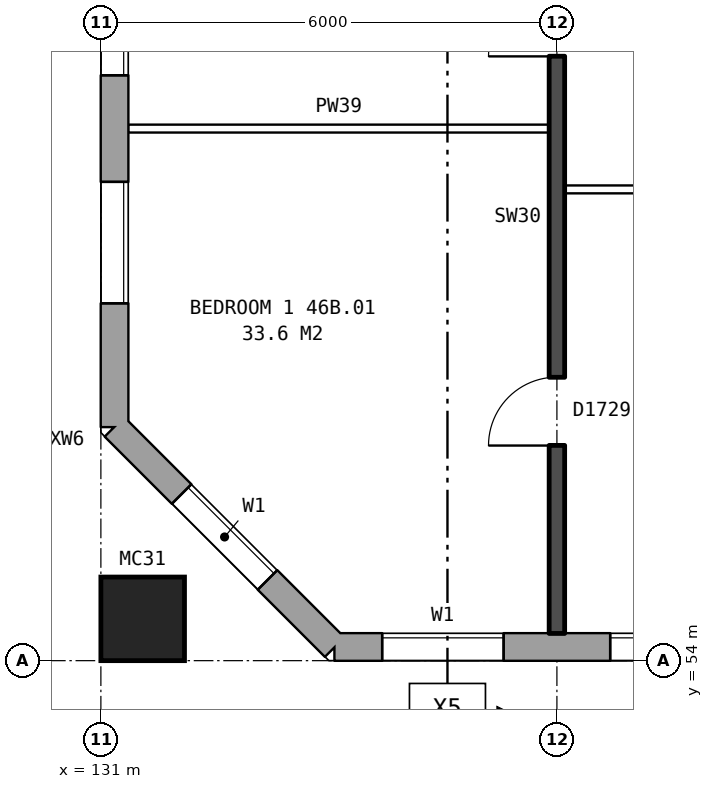
"""IFC4 building model, lengths in metres.
Left out: names, types, materials, properties, quantities, classifications, styles, units other than length and angle.
Written with IfcOpenShell. Run it as: python <this file> out.ifc"""

import sys

from ifc_helpers import new_model, si_unit, direction, frame, frame_2d, origin, origin_2d, place, context, subcontext, project, spatial, rectangle, hollow_rectangle, extrude, element, fill, save


model = new_model("IFC4")
c1 = context("Model", 3, precision=1e-05, world=origin(), true_north=direction((0.0, 1.0)))
c2 = subcontext(c1, "Body", "Model", "MODEL_VIEW")
j1 = project(units=[si_unit("LENGTHUNIT", "METRE"), si_unit("PLANEANGLEUNIT", "RADIAN")], contexts=[c1])
p1 = place(None, origin())
s1 = spatial("IfcSite", under=j1, at=p1, CompositionType="ELEMENT")
p2 = place(p1, origin())
s2 = spatial("IfcBuilding", under=s1, at=p2, CompositionType="ELEMENT")
p3 = place(p2, frame((0.0, 0.0, 164.0)))
s3 = spatial("IfcBuildingStorey", under=s2, at=p3, CompositionType="ELEMENT", Elevation=164.0)
p4 = place(p3, frame((131.55, 54.55, 0.0), z_axis=(0.0, 0.0, 1.0), x_axis=(1.0, 0.0, 0.0)))
e1 = element("IfcColumn", 1, at=p4, inside=s3, PredefinedType="COLUMN", context=c2, shape_type="SweptSolid", body=[
    extrude(hollow_rectangle(XDim=1.1, YDim=1.1, WallThickness=0.06, at=origin_2d()), origin(), (0.0, 0.0, 1.0), 3.1),
])
p5 = place(p3, frame((131.18, 57.075, 0.0), z_axis=(0.0, 0.0, 1.0), x_axis=(0.707106781187, -0.707106781187, 0.0)))
e2 = element("IfcWall", 2, at=p5, inside=s3, PredefinedType="STANDARD", context=c2, shape_type="SweptSolid", body=[
    extrude(rectangle(XDim=4.094, YDim=0.36, at=frame_2d((2.047, 0.0))), origin(), (0.0, 0.0, 1.0), 2.85),
])
p6 = place(p5, frame((1.247, 0.0, 0.8)))
e3 = element("IfcOpeningElement", 3, at=p6, cuts=e2, PredefinedType="OPENING", context=c2, shape_type="SweptSolid", body=[
    extrude(rectangle(XDim=1.6, YDim=1.8, at=frame_2d((0.8, 0.9))), frame((0.0, 0.19, 0.0), z_axis=(0.0, -1.0, 0.0), x_axis=(1.0, 0.0, 0.0)), (0.0, 0.0, 1.0), 0.38),
])
p7 = place(p3, frame((134.075, 54.18, 0.0), z_axis=(0.0, 0.0, 1.0), x_axis=(1.0, 0.0, 0.0)))
e4 = element("IfcWall", 4, at=p7, inside=s3, PredefinedType="STANDARD", context=c2, shape_type="SweptSolid", body=[
    extrude(rectangle(XDim=34.351, YDim=0.36, at=frame_2d((17.175, 0.0))), origin(), (0.0, 0.0, 1.0), 2.85),
])
p8 = place(p7, frame((0.625, 0.0, 0.8)))
e5 = element("IfcOpeningElement", 5, at=p8, cuts=e4, PredefinedType="OPENING", context=c2, shape_type="SweptSolid", body=[
    extrude(rectangle(XDim=1.6, YDim=1.8, at=frame_2d((0.8, 0.9))), frame((0.0, 0.19, 0.0), z_axis=(0.0, -1.0, 0.0), x_axis=(1.0, 0.0, 0.0)), (0.0, 0.0, 1.0), 0.38),
])
p9 = place(p7, frame((3.625, 0.0, 0.8)))
e6 = element("IfcOpeningElement", 6, at=p9, cuts=e4, PredefinedType="OPENING", context=c2, shape_type="SweptSolid", body=[
    extrude(rectangle(XDim=1.6, YDim=1.8, at=frame_2d((0.8, 0.9))), frame((0.0, 0.19, 0.0), z_axis=(0.0, -1.0, 0.0), x_axis=(1.0, 0.0, 0.0)), (0.0, 0.0, 1.0), 0.38),
])
p10 = place(p7, frame((6.625, 0.0, 0.8)))
e7 = element("IfcOpeningElement", 7, at=p10, cuts=e4, PredefinedType="OPENING", context=c2, shape_type="SweptSolid", body=[
    extrude(rectangle(XDim=1.6, YDim=1.8, at=frame_2d((0.8, 0.9))), frame((0.0, 0.19, 0.0), z_axis=(0.0, -1.0, 0.0), x_axis=(1.0, 0.0, 0.0)), (0.0, 0.0, 1.0), 0.38),
])
p11 = place(p7, frame((9.625, 0.0, 0.8)))
e8 = element("IfcOpeningElement", 8, at=p11, cuts=e4, PredefinedType="OPENING", context=c2, shape_type="SweptSolid", body=[
    extrude(rectangle(XDim=1.6, YDim=1.8, at=frame_2d((0.8, 0.9))), frame((0.0, 0.19, 0.0), z_axis=(0.0, -1.0, 0.0), x_axis=(1.0, 0.0, 0.0)), (0.0, 0.0, 1.0), 0.38),
])
p12 = place(p7, frame((12.625, 0.0, 0.8)))
e9 = element("IfcOpeningElement", 9, at=p12, cuts=e4, PredefinedType="OPENING", context=c2, shape_type="SweptSolid", body=[
    extrude(rectangle(XDim=1.6, YDim=1.8, at=frame_2d((0.8, 0.9))), frame((0.0, 0.19, 0.0), z_axis=(0.0, -1.0, 0.0), x_axis=(1.0, 0.0, 0.0)), (0.0, 0.0, 1.0), 0.38),
])
p13 = place(p7, frame((15.975, 0.0, 0.15)))
e10 = element("IfcOpeningElement", 10, at=p13, cuts=e4, PredefinedType="OPENING", context=c2, shape_type="SweptSolid", body=[
    extrude(rectangle(XDim=0.6, YDim=0.9, at=frame_2d((0.3, 0.45))), frame((0.0, 0.19, 0.0), z_axis=(0.0, -1.0, 0.0), x_axis=(1.0, 0.0, 0.0)), (0.0, 0.0, 1.0), 0.38),
])
p14 = place(p7, frame((18.825, 0.0, 1.7)))
e11 = element("IfcOpeningElement", 11, at=p14, cuts=e4, PredefinedType="OPENING", context=c2, shape_type="SweptSolid", body=[
    extrude(rectangle(XDim=0.6, YDim=0.9, at=frame_2d((0.3, 0.45))), frame((0.0, 0.19, 0.0), z_axis=(0.0, -1.0, 0.0), x_axis=(1.0, 0.0, 0.0)), (0.0, 0.0, 1.0), 0.38),
])
p15 = place(p7, frame((21.625, 0.0, 0.8)))
e12 = element("IfcOpeningElement", 12, at=p15, cuts=e4, PredefinedType="OPENING", context=c2, shape_type="SweptSolid", body=[
    extrude(rectangle(XDim=1.6, YDim=1.8, at=frame_2d((0.8, 0.9))), frame((0.0, 0.19, 0.0), z_axis=(0.0, -1.0, 0.0), x_axis=(1.0, 0.0, 0.0)), (0.0, 0.0, 1.0), 0.38),
])
p16 = place(p7, frame((24.625, 0.0, 0.8)))
e13 = element("IfcOpeningElement", 13, at=p16, cuts=e4, PredefinedType="OPENING", context=c2, shape_type="SweptSolid", body=[
    extrude(rectangle(XDim=1.6, YDim=1.8, at=frame_2d((0.8, 0.9))), frame((0.0, 0.19, 0.0), z_axis=(0.0, -1.0, 0.0), x_axis=(1.0, 0.0, 0.0)), (0.0, 0.0, 1.0), 0.38),
])
p17 = place(p7, frame((27.625, 0.0, 0.8)))
e14 = element("IfcOpeningElement", 14, at=p17, cuts=e4, PredefinedType="OPENING", context=c2, shape_type="SweptSolid", body=[
    extrude(rectangle(XDim=1.6, YDim=1.8, at=frame_2d((0.8, 0.9))), frame((0.0, 0.19, 0.0), z_axis=(0.0, -1.0, 0.0), x_axis=(1.0, 0.0, 0.0)), (0.0, 0.0, 1.0), 0.38),
])
p18 = place(p7, frame((30.625, 0.0, 0.8)))
e15 = element("IfcOpeningElement", 15, at=p18, cuts=e4, PredefinedType="OPENING", context=c2, shape_type="SweptSolid", body=[
    extrude(rectangle(XDim=1.6, YDim=1.8, at=frame_2d((0.8, 0.9))), frame((0.0, 0.19, 0.0), z_axis=(0.0, -1.0, 0.0), x_axis=(1.0, 0.0, 0.0)), (0.0, 0.0, 1.0), 0.38),
])
p19 = place(p7, frame((16.875, 0.0, 0.15)))
e16 = element("IfcOpeningElement", 16, at=p19, cuts=e4, PredefinedType="OPENING", context=c2, shape_type="SweptSolid", body=[
    extrude(rectangle(XDim=0.8, YDim=1.5, at=frame_2d((0.4, 0.75))), frame((0.0, 0.19, 0.0), z_axis=(0.0, -1.0, 0.0), x_axis=(1.0, 0.0, 0.0)), (0.0, 0.0, 1.0), 0.38),
])
p20 = place(p7, frame((19.725, 0.0, 0.9)))
e17 = element("IfcOpeningElement", 17, at=p20, cuts=e4, PredefinedType="OPENING", context=c2, shape_type="SweptSolid", body=[
    extrude(rectangle(XDim=1.0, YDim=1.5, at=frame_2d((0.5, 0.75))), frame((0.0, 0.19, 0.0), z_axis=(0.0, -1.0, 0.0), x_axis=(1.0, 0.0, 0.0)), (0.0, 0.0, 1.0), 0.38),
])
p21 = place(p3, frame((131.18, 82.925, 0.0), z_axis=(0.0, 0.0, 1.0), x_axis=(0.0, -1.0, 0.0)))
e18 = element("IfcWall", 18, at=p21, inside=s3, PredefinedType="STANDARD", context=c2, shape_type="SweptSolid", body=[
    extrude(rectangle(XDim=25.851, YDim=0.36, at=frame_2d((12.925, 0.0))), origin(), (0.0, 0.0, 1.0), 2.85),
])
p22 = place(p21, frame((1.625, 0.0, 0.8)))
e19 = element("IfcOpeningElement", 19, at=p22, cuts=e18, PredefinedType="OPENING", context=c2, shape_type="SweptSolid", body=[
    extrude(rectangle(XDim=1.6, YDim=1.8, at=frame_2d((0.8, 0.9))), frame((0.0, 0.19, 0.0), z_axis=(0.0, -1.0, 0.0), x_axis=(1.0, 0.0, 0.0)), (0.0, 0.0, 1.0), 0.38),
])
p23 = place(p21, frame((4.625, 0.0, 0.8)))
e20 = element("IfcOpeningElement", 20, at=p23, cuts=e18, PredefinedType="OPENING", context=c2, shape_type="SweptSolid", body=[
    extrude(rectangle(XDim=1.6, YDim=1.8, at=frame_2d((0.8, 0.9))), frame((0.0, 0.19, 0.0), z_axis=(0.0, -1.0, 0.0), x_axis=(1.0, 0.0, 0.0)), (0.0, 0.0, 1.0), 0.38),
])
p24 = place(p21, frame((19.625, 0.0, 0.8)))
e21 = element("IfcOpeningElement", 21, at=p24, cuts=e18, PredefinedType="OPENING", context=c2, shape_type="SweptSolid", body=[
    extrude(rectangle(XDim=1.6, YDim=1.8, at=frame_2d((0.8, 0.9))), frame((0.0, 0.19, 0.0), z_axis=(0.0, -1.0, 0.0), x_axis=(1.0, 0.0, 0.0)), (0.0, 0.0, 1.0), 0.38),
])
p25 = place(p21, frame((22.625, 0.0, 0.8)))
e22 = element("IfcOpeningElement", 22, at=p25, cuts=e18, PredefinedType="OPENING", context=c2, shape_type="SweptSolid", body=[
    extrude(rectangle(XDim=1.6, YDim=1.8, at=frame_2d((0.8, 0.9))), frame((0.0, 0.19, 0.0), z_axis=(0.0, -1.0, 0.0), x_axis=(1.0, 0.0, 0.0)), (0.0, 0.0, 1.0), 0.38),
])
p26 = place(p3, frame((137.1, 60.2, 0.0), z_axis=(0.0, 0.0, 1.0), x_axis=(1.0, 0.0, 0.0)))
e23 = element("IfcWall", 23, at=p26, inside=s3, PredefinedType="PARTITIONING", context=c2, shape_type="SweptSolid", body=[
    extrude(rectangle(XDim=5.8, YDim=0.1, at=frame_2d((2.9, 0.0))), origin(), (0.0, 0.0, 1.0), 2.85),
])
p27 = place(p26, frame((1.3, 0.0, 0.0)))
e24 = element("IfcOpeningElement", 24, at=p27, cuts=e23, PredefinedType="OPENING", context=c2, shape_type="SweptSolid", body=[
    extrude(rectangle(XDim=0.9, YDim=2.1, at=frame_2d((0.45, 1.05))), frame((0.0, 0.06, 0.0), z_axis=(0.0, -1.0, 0.0), x_axis=(1.0, 0.0, 0.0)), (0.0, 0.0, 1.0), 0.12),
])
p28 = place(p26, frame((4.2, 0.0, 0.0)))
e25 = element("IfcOpeningElement", 25, at=p28, cuts=e23, PredefinedType="OPENING", context=c2, shape_type="SweptSolid", body=[
    extrude(rectangle(XDim=0.9, YDim=2.1, at=frame_2d((0.45, 1.05))), frame((0.0, 0.06, 0.0), z_axis=(0.0, -1.0, 0.0), x_axis=(1.0, 0.0, 0.0)), (0.0, 0.0, 1.0), 0.12),
])
p29 = place(p3, frame((131.36, 61.0, 0.0), z_axis=(0.0, 0.0, 1.0), x_axis=(1.0, 0.0, 0.0)))
e26 = element("IfcWall", 26, at=p29, inside=s3, PredefinedType="PARTITIONING", context=c2, shape_type="SweptSolid", body=[
    extrude(rectangle(XDim=5.54, YDim=0.1, at=frame_2d((2.77, 0.0))), origin(), (0.0, 0.0, 1.0), 2.85),
])
p30 = place(p3, frame((137.0, 54.36, 0.0), z_axis=(0.0, 0.0, 1.0), x_axis=(0.0, 1.0, 0.0)))
e27 = element("IfcWall", 27, at=p30, inside=s3, PredefinedType="SOLIDWALL", context=c2, shape_type="SweptSolid", body=[
    extrude(rectangle(XDim=9.44, YDim=0.2, at=frame_2d((4.72, 0.0))), origin(), (0.0, 0.0, 1.0), 2.85),
])
p31 = place(p30, frame((2.47, 0.0, 0.0)))
e28 = element("IfcOpeningElement", 28, at=p31, cuts=e27, PredefinedType="OPENING", context=c2, shape_type="SweptSolid", body=[
    extrude(rectangle(XDim=0.9, YDim=2.1, at=frame_2d((0.45, 1.05))), frame((0.0, 0.11, 0.0), z_axis=(0.0, -1.0, 0.0), x_axis=(1.0, 0.0, 0.0)), (0.0, 0.0, 1.0), 0.22),
])
p32 = place(p30, frame((7.59, 0.0, 0.0)))
e29 = element("IfcOpeningElement", 29, at=p32, cuts=e27, PredefinedType="OPENING", context=c2, shape_type="SweptSolid", body=[
    extrude(rectangle(XDim=0.9, YDim=2.1, at=frame_2d((0.45, 1.05))), frame((0.0, 0.11, 0.0), z_axis=(0.0, -1.0, 0.0), x_axis=(1.0, 0.0, 0.0)), (0.0, 0.0, 1.0), 0.22),
])
p33 = place(p6, origin())
e30 = element("IfcWindow", 30, at=p33, inside=s3, PartitioningType="SINGLE_PANEL", PredefinedType="WINDOW", context=c2, shape_type="SweptSolid", body=[
    extrude(rectangle(XDim=1.6, YDim=1.8, at=frame_2d((0.8, 0.9))), frame((0.0, 0.15, 0.0), z_axis=(0.0, -1.0, 0.0), x_axis=(1.0, 0.0, 0.0)), (0.0, 0.0, 1.0), 0.06),
])
fill(e3, e30)
p34 = place(p8, origin())
e31 = element("IfcWindow", 31, at=p34, inside=s3, PartitioningType="SINGLE_PANEL", PredefinedType="WINDOW", context=c2, shape_type="SweptSolid", body=[
    extrude(rectangle(XDim=1.6, YDim=1.8, at=frame_2d((0.8, 0.9))), frame((0.0, 0.15, 0.0), z_axis=(0.0, -1.0, 0.0), x_axis=(1.0, 0.0, 0.0)), (0.0, 0.0, 1.0), 0.06),
])
fill(e5, e31)
p35 = place(p9, origin())
e32 = element("IfcWindow", 32, at=p35, inside=s3, PartitioningType="SINGLE_PANEL", PredefinedType="WINDOW", context=c2, shape_type="SweptSolid", body=[
    extrude(rectangle(XDim=1.6, YDim=1.8, at=frame_2d((0.8, 0.9))), frame((0.0, 0.15, 0.0), z_axis=(0.0, -1.0, 0.0), x_axis=(1.0, 0.0, 0.0)), (0.0, 0.0, 1.0), 0.06),
])
fill(e6, e32)
p36 = place(p24, origin())
e33 = element("IfcWindow", 33, at=p36, inside=s3, PartitioningType="SINGLE_PANEL", PredefinedType="WINDOW", context=c2, shape_type="SweptSolid", body=[
    extrude(rectangle(XDim=1.6, YDim=1.8, at=frame_2d((0.8, 0.9))), frame((0.0, 0.15, 0.0), z_axis=(0.0, -1.0, 0.0), x_axis=(1.0, 0.0, 0.0)), (0.0, 0.0, 1.0), 0.06),
])
fill(e21, e33)
p37 = place(p25, origin())
e34 = element("IfcWindow", 34, at=p37, inside=s3, PartitioningType="SINGLE_PANEL", PredefinedType="WINDOW", context=c2, shape_type="SweptSolid", body=[
    extrude(rectangle(XDim=1.6, YDim=1.8, at=frame_2d((0.8, 0.9))), frame((0.0, 0.15, 0.0), z_axis=(0.0, -1.0, 0.0), x_axis=(1.0, 0.0, 0.0)), (0.0, 0.0, 1.0), 0.06),
])
fill(e22, e34)
p38 = place(p31, origin())
e35 = element("IfcDoor", 35, at=p38, inside=s3, OperationType="SINGLE_SWING_LEFT", PredefinedType="DOOR", context=c2, shape_type="SweptSolid", body=[
    extrude(rectangle(XDim=0.9, YDim=2.1, at=frame_2d((0.45, 1.05))), frame((0.0, 0.025, 0.0), z_axis=(0.0, -1.0, 0.0), x_axis=(1.0, 0.0, 0.0)), (0.0, 0.0, 1.0), 0.05),
])
fill(e28, e35)
p39 = place(p32, origin())
e36 = element("IfcDoor", 36, at=p39, inside=s3, OperationType="SINGLE_SWING_LEFT", PredefinedType="DOOR", context=c2, shape_type="SweptSolid", body=[
    extrude(rectangle(XDim=0.9, YDim=2.1, at=frame_2d((0.45, 1.05))), frame((0.0, 0.025, 0.0), z_axis=(0.0, -1.0, 0.0), x_axis=(1.0, 0.0, 0.0)), (0.0, 0.0, 1.0), 0.05),
])
fill(e29, e36)
save(model, sys.argv[1])
